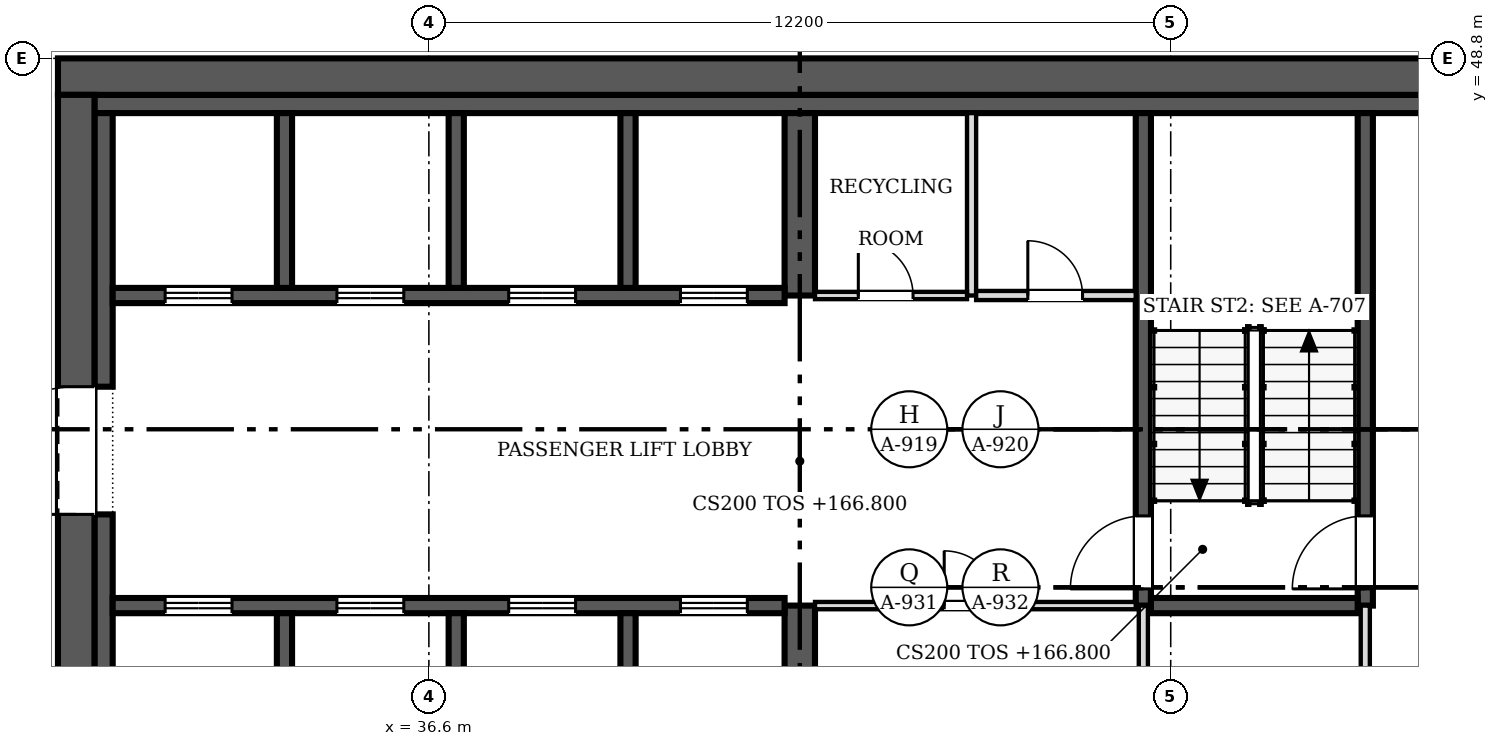
"""IFC4 building model, lengths in metres.
Left out: names, types, materials, properties, quantities, classifications, styles, units other than length and angle.
Written with IfcOpenShell. Run it as: python <this file> out.ifc"""

import sys

from ifc_helpers import new_model, si_unit, direction, frame, frame_2d, origin, place, context, subcontext, project, spatial, rectangle, extrude, source, transform, mapped, element, fill, save


model = new_model("IFC4")
c1 = context("Model", 3, precision=1e-05, world=origin(), true_north=direction((0.0, 1.0)))
c2 = subcontext(c1, "Body", "Model", "MODEL_VIEW")
j1 = project(units=[si_unit("LENGTHUNIT", "METRE"), si_unit("PLANEANGLEUNIT", "RADIAN")], contexts=[c1])
p1 = place(None, origin())
s1 = spatial("IfcSite", under=j1, at=p1, CompositionType="ELEMENT")
p2 = place(p1, origin())
s2 = spatial("IfcBuilding", under=s1, at=p2, CompositionType="ELEMENT")
p3 = place(p2, frame((0.0, 0.0, 166.8)))
s3 = spatial("IfcBuildingStorey", under=s2, at=p3, CompositionType="ELEMENT", Elevation=166.8)
p4 = place(p3, frame((30.8, 25.0, 0.0), z_axis=(0.0, 0.0, 1.0), x_axis=(0.0, 1.0, 0.0)))
e1 = element("IfcWall", 1, at=p4, inside=s3, PredefinedType="SHEAR", context=c2, shape_type="SweptSolid", body=[
    extrude(rectangle(XDim=23.2, YDim=0.6, at=frame_2d((11.6, 0.0))), origin(), (0.0, 0.0, 1.0), 3.8),
])
m1 = source(origin(), c2, "Body", "SweptSolid", [
    extrude(rectangle(XDim=2.1, YDim=2.4, at=frame_2d((1.05, 1.2))), frame((0.0, 0.31, 0.0), z_axis=(0.0, -1.0, 0.0), x_axis=(1.0, 0.0, 0.0)), (0.0, 0.0, 1.0), 0.62),
])
p5 = place(p4, frame((4.8, 0.0, 0.0)))
e2 = element("IfcOpeningElement", 2, at=p5, cuts=e1, PredefinedType="OPENING", context=c2, shape_type="MappedRepresentation", body=[
    mapped(m1, transform((0.0, 0.0, 0.0), scale=1.0)),
])
p6 = place(p4, frame((16.3, 0.0, 0.0)))
e3 = element("IfcOpeningElement", 3, at=p6, cuts=e1, PredefinedType="OPENING", context=c2, shape_type="MappedRepresentation", body=[
    mapped(m1, transform((0.0, 0.0, 0.0), scale=1.0)),
])
p7 = place(p3, frame((30.5, 48.5, 0.0), z_axis=(0.0, 0.0, 1.0), x_axis=(1.0, 0.0, 0.0)))
e4 = element("IfcWall", 4, at=p7, inside=s3, PredefinedType="SHEAR", context=c2, shape_type="SweptSolid", body=[
    extrude(rectangle(XDim=24.4, YDim=0.6, at=frame_2d((12.2, 0.0))), origin(), (0.0, 0.0, 1.0), 3.8),
])
p8 = place(p3, frame((31.1, 48.05, 0.0), z_axis=(0.0, 0.0, 1.0), x_axis=(1.0, 0.0, 0.0)))
e5 = element("IfcWall", 5, at=p8, inside=s3, PredefinedType="SOLIDWALL", context=c2, shape_type="SweptSolid", body=[
    extrude(rectangle(XDim=23.2, YDim=0.3, at=frame_2d((11.6, 0.0))), origin(), (0.0, 0.0, 1.0), 3.8),
])
p9 = place(p3, frame((31.25, 31.9, 0.0), z_axis=(0.0, 0.0, 1.0), x_axis=(0.0, 1.0, 0.0)))
e6 = element("IfcWall", 6, at=p9, inside=s3, PredefinedType="SOLIDWALL", context=c2, shape_type="SweptSolid", body=[
    extrude(rectangle(XDim=9.4, YDim=0.3, at=frame_2d((4.7, 0.0))), origin(), (0.0, 0.0, 1.0), 3.8),
])
p10 = place(p3, frame((31.25, 43.4, 0.0), z_axis=(0.0, 0.0, 1.0), x_axis=(0.0, 1.0, 0.0)))
e7 = element("IfcWall", 7, at=p10, inside=s3, PredefinedType="SOLIDWALL", context=c2, shape_type="SweptSolid", body=[
    extrude(rectangle(XDim=4.5, YDim=0.3, at=frame_2d((2.25, 0.0))), origin(), (0.0, 0.0, 1.0), 3.8),
])
p11 = place(p3, frame((42.7, 36.85, 0.0), z_axis=(0.0, 0.0, 1.0), x_axis=(0.0, 1.0, 0.0)))
e8 = element("IfcWall", 8, at=p11, inside=s3, PredefinedType="SHEAR", context=c2, shape_type="SweptSolid", body=[
    extrude(rectangle(XDim=2.95, YDim=0.5, at=frame_2d((1.475, 0.0))), origin(), (0.0, 0.0, 1.0), 3.8),
])
p12 = place(p3, frame((42.7, 44.9, 0.0), z_axis=(0.0, 0.0, 1.0), x_axis=(0.0, 1.0, 0.0)))
e9 = element("IfcWall", 9, at=p12, inside=s3, PredefinedType="SHEAR", context=c2, shape_type="SweptSolid", body=[
    extrude(rectangle(XDim=3.0, YDim=0.5, at=frame_2d((1.5, 0.0))), origin(), (0.0, 0.0, 1.0), 3.8),
])
p13 = place(p3, frame((31.4, 39.8, 0.0), z_axis=(0.0, 0.0, 1.0), x_axis=(1.0, 0.0, 0.0)))
e10 = element("IfcWall", 10, at=p13, inside=s3, PredefinedType="SOLIDWALL", context=c2, shape_type="SweptSolid", body=[
    extrude(rectangle(XDim=11.05, YDim=0.25, at=frame_2d((5.525, 0.0))), origin(), (0.0, 0.0, 1.0), 3.8),
])
m2 = source(origin(), c2, "Body", "SweptSolid", [
    extrude(rectangle(XDim=1.1, YDim=2.1, at=frame_2d((0.55, 1.05))), frame((0.0, 0.135, 0.0), z_axis=(0.0, -1.0, 0.0), x_axis=(1.0, 0.0, 0.0)), (0.0, 0.0, 1.0), 0.27),
])
p14 = place(p13, frame((0.863, 0.0, 0.0)))
e11 = element("IfcOpeningElement", 11, at=p14, cuts=e10, PredefinedType="OPENING", context=c2, shape_type="MappedRepresentation", body=[
    mapped(m2, transform((0.0, 0.0, 0.0), scale=1.0)),
])
p15 = place(p13, frame((3.688, 0.0, 0.0)))
e12 = element("IfcOpeningElement", 12, at=p15, cuts=e10, PredefinedType="OPENING", context=c2, shape_type="MappedRepresentation", body=[
    mapped(m2, transform((0.0, 0.0, 0.0), scale=1.0)),
])
p16 = place(p13, frame((6.512, 0.0, 0.0)))
e13 = element("IfcOpeningElement", 13, at=p16, cuts=e10, PredefinedType="OPENING", context=c2, shape_type="MappedRepresentation", body=[
    mapped(m2, transform((0.0, 0.0, 0.0), scale=1.0)),
])
p17 = place(p13, frame((9.337, 0.0, 0.0)))
e14 = element("IfcOpeningElement", 14, at=p17, cuts=e10, PredefinedType="OPENING", context=c2, shape_type="MappedRepresentation", body=[
    mapped(m2, transform((0.0, 0.0, 0.0), scale=1.0)),
])
p18 = place(p3, frame((42.45, 44.9, 0.0), z_axis=(0.0, 0.0, 1.0), x_axis=(-1.0, 0.0, 0.0)))
e15 = element("IfcWall", 15, at=p18, inside=s3, PredefinedType="SOLIDWALL", context=c2, shape_type="SweptSolid", body=[
    extrude(rectangle(XDim=11.05, YDim=0.25, at=frame_2d((5.525, 0.0))), origin(), (0.0, 0.0, 1.0), 3.8),
])
p19 = place(p18, frame((9.087, 0.0, 0.0)))
e16 = element("IfcOpeningElement", 16, at=p19, cuts=e15, PredefinedType="OPENING", context=c2, shape_type="MappedRepresentation", body=[
    mapped(m2, transform((0.0, 0.0, 0.0), scale=1.0)),
])
p20 = place(p18, frame((6.262, 0.0, 0.0)))
e17 = element("IfcOpeningElement", 17, at=p20, cuts=e15, PredefinedType="OPENING", context=c2, shape_type="MappedRepresentation", body=[
    mapped(m2, transform((0.0, 0.0, 0.0), scale=1.0)),
])
p21 = place(p18, frame((3.438, 0.0, 0.0)))
e18 = element("IfcOpeningElement", 18, at=p21, cuts=e15, PredefinedType="OPENING", context=c2, shape_type="MappedRepresentation", body=[
    mapped(m2, transform((0.0, 0.0, 0.0), scale=1.0)),
])
p22 = place(p18, frame((0.613, 0.0, 0.0)))
e19 = element("IfcOpeningElement", 19, at=p22, cuts=e15, PredefinedType="OPENING", context=c2, shape_type="MappedRepresentation", body=[
    mapped(m2, transform((0.0, 0.0, 0.0), scale=1.0)),
])
p23 = place(p3, frame((48.35, 47.9, 0.0), z_axis=(0.0, 0.0, 1.0), x_axis=(0.0, -1.0, 0.0)))
e20 = element("IfcWall", 20, at=p23, inside=s3, PredefinedType="SOLIDWALL", context=c2, shape_type="SweptSolid", body=[
    extrude(rectangle(XDim=8.1, YDim=0.25, at=frame_2d((4.05, 0.0))), origin(), (0.0, 0.0, 1.0), 3.8),
])
m3 = source(origin(), c2, "Body", "SweptSolid", [
    extrude(rectangle(XDim=1.2, YDim=2.1, at=frame_2d((0.6, 1.05))), frame((0.0, 0.135, 0.0), z_axis=(0.0, -1.0, 0.0), x_axis=(1.0, 0.0, 0.0)), (0.0, 0.0, 1.0), 0.27),
])
p24 = place(p23, frame((6.625, 0.0, 0.0)))
e21 = element("IfcOpeningElement", 21, at=p24, cuts=e20, PredefinedType="OPENING", context=c2, shape_type="MappedRepresentation", body=[
    mapped(m3, transform((0.0, 0.0, 0.0), scale=1.0)),
])
p25 = place(p3, frame((52.0, 39.8, 0.0), z_axis=(0.0, 0.0, 1.0), x_axis=(0.0, 1.0, 0.0)))
e22 = element("IfcWall", 22, at=p25, inside=s3, PredefinedType="SOLIDWALL", context=c2, shape_type="SweptSolid", body=[
    extrude(rectangle(XDim=8.1, YDim=0.25, at=frame_2d((4.05, 0.0))), origin(), (0.0, 0.0, 1.0), 3.8),
])
p26 = place(p25, frame((0.275, 0.0, 0.0)))
e23 = element("IfcOpeningElement", 23, at=p26, cuts=e22, PredefinedType="OPENING", context=c2, shape_type="MappedRepresentation", body=[
    mapped(m3, transform((0.0, 0.0, 0.0), scale=1.0)),
])
p27 = place(p3, frame((48.475, 39.8, 0.0), z_axis=(0.0, 0.0, 1.0), x_axis=(1.0, 0.0, 0.0)))
e24 = element("IfcWall", 24, at=p27, inside=s3, PredefinedType="SOLIDWALL", context=c2, shape_type="SweptSolid", body=[
    extrude(rectangle(XDim=3.4, YDim=0.25, at=frame_2d((1.7, 0.0))), origin(), (0.0, 0.0, 1.0), 3.8),
])
for number, where, z_axis, x_axis in (
    (25, (34.225, 36.85, 0.0), (0.0, 0.0, 1.0), (0.0, 1.0, 0.0)),
    (26, (37.05, 36.85, 0.0), (0.0, 0.0, 1.0), (0.0, 1.0, 0.0)),
    (27, (39.875, 36.85, 0.0), (0.0, 0.0, 1.0), (0.0, 1.0, 0.0)),
):
    element("IfcWall", number, at=place(p3, frame(where, z_axis=z_axis, x_axis=x_axis)), inside=s3, PredefinedType="SOLIDWALL", context=c2, shape_type="SweptSolid", body=[
        extrude(rectangle(XDim=2.825, YDim=0.25, at=frame_2d((1.413, 0.0))), origin(), (0.0, 0.0, 1.0), 3.8),
    ])
for number, where, z_axis, x_axis in (
    (28, (34.225, 45.025, 0.0), (0.0, 0.0, 1.0), (0.0, 1.0, 0.0)),
    (29, (37.05, 45.025, 0.0), (0.0, 0.0, 1.0), (0.0, 1.0, 0.0)),
    (30, (39.875, 45.025, 0.0), (0.0, 0.0, 1.0), (0.0, 1.0, 0.0)),
):
    element("IfcWall", number, at=place(p3, frame(where, z_axis=z_axis, x_axis=x_axis)), inside=s3, PredefinedType="SOLIDWALL", context=c2, shape_type="SweptSolid", body=[
        extrude(rectangle(XDim=2.875, YDim=0.25, at=frame_2d((1.438, 0.0))), origin(), (0.0, 0.0, 1.0), 3.8),
    ])
p28 = place(p3, frame((52.0, 33.525, 0.0), z_axis=(0.0, 0.0, 1.0), x_axis=(0.0, 1.0, 0.0)))
e31 = element("IfcWall", 31, at=p28, inside=s3, PredefinedType="PARTITIONING", context=c2, shape_type="SweptSolid", body=[
    extrude(rectangle(XDim=6.275, YDim=0.15, at=frame_2d((3.138, 0.0))), origin(), (0.0, 0.0, 1.0), 3.6),
])
m4 = source(origin(), c2, "Body", "SweptSolid", [
    extrude(rectangle(XDim=0.9, YDim=2.1, at=frame_2d((0.45, 1.05))), frame((0.0, 0.085, 0.0), z_axis=(0.0, -1.0, 0.0), x_axis=(1.0, 0.0, 0.0)), (0.0, 0.0, 1.0), 0.17),
])
p29 = place(p28, frame((1.025, 0.0, 0.0)))
e32 = element("IfcOpeningElement", 32, at=p29, cuts=e31, PredefinedType="OPENING", context=c2, shape_type="MappedRepresentation", body=[
    mapped(m4, transform((0.0, 0.0, 0.0), scale=1.0)),
])
p30 = place(p3, frame((48.225, 39.8, 0.0), z_axis=(0.0, 0.0, 1.0), x_axis=(-1.0, 0.0, 0.0)))
e33 = element("IfcWall", 33, at=p30, inside=s3, PredefinedType="PARTITIONING", context=c2, shape_type="SweptSolid", body=[
    extrude(rectangle(XDim=5.275, YDim=0.12, at=frame_2d((2.638, 0.0))), origin(), (0.0, 0.0, 1.0), 3.6),
])
m5 = source(origin(), c2, "Body", "SweptSolid", [
    extrude(rectangle(XDim=0.9, YDim=2.1, at=frame_2d((0.45, 1.05))), frame((0.0, 0.07, 0.0), z_axis=(0.0, -1.0, 0.0), x_axis=(1.0, 0.0, 0.0)), (0.0, 0.0, 1.0), 0.14),
])
p31 = place(p30, frame((2.25, 0.0, 0.0)))
e34 = element("IfcOpeningElement", 34, at=p31, cuts=e33, PredefinedType="OPENING", context=c2, shape_type="MappedRepresentation", body=[
    mapped(m5, transform((0.0, 0.0, 0.0), scale=1.0)),
])
p32 = place(p3, frame((48.35, 36.85, 0.0), z_axis=(0.0, 0.0, 1.0), x_axis=(0.0, 1.0, 0.0)))
e35 = element("IfcWall", 35, at=p32, inside=s3, PredefinedType="PARTITIONING", context=c2, shape_type="SweptSolid", body=[
    extrude(rectangle(XDim=2.95, YDim=0.15, at=frame_2d((1.475, 0.0))), origin(), (0.0, 0.0, 1.0), 3.6),
])
p33 = place(p3, frame((45.525, 44.9, 0.0), z_axis=(0.0, 0.0, 1.0), x_axis=(0.0, 1.0, 0.0)))
e36 = element("IfcWall", 36, at=p33, inside=s3, PredefinedType="PARTITIONING", context=c2, shape_type="SweptSolid", body=[
    extrude(rectangle(XDim=3.0, YDim=0.15, at=frame_2d((1.5, 0.0))), origin(), (0.0, 0.0, 1.0), 3.6),
])
p34 = place(p3, frame((42.95, 44.9, 0.0), z_axis=(0.0, 0.0, 1.0), x_axis=(1.0, 0.0, 0.0)))
e37 = element("IfcWall", 37, at=p34, inside=s3, PredefinedType="PARTITIONING", context=c2, shape_type="SweptSolid", body=[
    extrude(rectangle(XDim=2.5, YDim=0.12, at=frame_2d((1.25, 0.0))), origin(), (0.0, 0.0, 1.0), 3.6),
])
p35 = place(p34, frame((0.712, 0.0, 0.0)))
e38 = element("IfcOpeningElement", 38, at=p35, cuts=e37, PredefinedType="OPENING", context=c2, shape_type="MappedRepresentation", body=[
    mapped(m5, transform((0.0, 0.0, 0.0), scale=1.0)),
])
p36 = place(p3, frame((45.6, 44.9, 0.0), z_axis=(0.0, 0.0, 1.0), x_axis=(1.0, 0.0, 0.0)))
e39 = element("IfcWall", 39, at=p36, inside=s3, PredefinedType="PARTITIONING", context=c2, shape_type="SweptSolid", body=[
    extrude(rectangle(XDim=2.625, YDim=0.15, at=frame_2d((1.312, 0.0))), origin(), (0.0, 0.0, 1.0), 3.6),
])
p37 = place(p36, frame((0.85, 0.0, 0.0)))
e40 = element("IfcOpeningElement", 40, at=p37, cuts=e39, PredefinedType="OPENING", context=c2, shape_type="MappedRepresentation", body=[
    mapped(m4, transform((0.0, 0.0, 0.0), scale=1.0)),
])
m6 = source(origin(), c2, "Body", "SweptSolid", [
    extrude(rectangle(XDim=2.1, YDim=2.4, at=frame_2d((1.05, 1.2))), frame((0.0, 0.025, 0.0), z_axis=(0.0, -1.0, 0.0), x_axis=(1.0, 0.0, 0.0)), (0.0, 0.0, 1.0), 0.05),
])
p38 = place(p6, origin())
e41 = element("IfcDoor", 41, at=p38, inside=s3, OperationType="DOUBLE_DOOR_SINGLE_SWING", PredefinedType="DOOR", context=c2, shape_type="MappedRepresentation", body=[
    mapped(m6, transform((0.0, 0.0, 0.0), scale=1.0)),
])
fill(e3, e41)
m7 = source(origin(), c2, "Body", "SweptSolid", [
    extrude(rectangle(XDim=1.1, YDim=2.1, at=frame_2d((0.55, 1.05))), frame((0.0, 0.025, 0.0), z_axis=(0.0, -1.0, 0.0), x_axis=(1.0, 0.0, 0.0)), (0.0, 0.0, 1.0), 0.05),
])
p39 = place(p14, origin())
e42 = element("IfcDoor", 42, at=p39, inside=s3, OperationType="DOUBLE_DOOR_SLIDING", PredefinedType="DOOR", context=c2, shape_type="MappedRepresentation", body=[
    mapped(m7, transform((0.0, 0.0, 0.0), scale=1.0)),
])
fill(e11, e42)
p40 = place(p15, origin())
e43 = element("IfcDoor", 43, at=p40, inside=s3, OperationType="DOUBLE_DOOR_SLIDING", PredefinedType="DOOR", context=c2, shape_type="MappedRepresentation", body=[
    mapped(m7, transform((0.0, 0.0, 0.0), scale=1.0)),
])
fill(e12, e43)
p41 = place(p16, origin())
e44 = element("IfcDoor", 44, at=p41, inside=s3, OperationType="DOUBLE_DOOR_SLIDING", PredefinedType="DOOR", context=c2, shape_type="MappedRepresentation", body=[
    mapped(m7, transform((0.0, 0.0, 0.0), scale=1.0)),
])
fill(e13, e44)
p42 = place(p17, origin())
e45 = element("IfcDoor", 45, at=p42, inside=s3, OperationType="DOUBLE_DOOR_SLIDING", PredefinedType="DOOR", context=c2, shape_type="MappedRepresentation", body=[
    mapped(m7, transform((0.0, 0.0, 0.0), scale=1.0)),
])
fill(e14, e45)
p43 = place(p19, origin())
e46 = element("IfcDoor", 46, at=p43, inside=s3, OperationType="DOUBLE_DOOR_SLIDING", PredefinedType="DOOR", context=c2, shape_type="MappedRepresentation", body=[
    mapped(m7, transform((0.0, 0.0, 0.0), scale=1.0)),
])
fill(e16, e46)
p44 = place(p20, origin())
e47 = element("IfcDoor", 47, at=p44, inside=s3, OperationType="DOUBLE_DOOR_SLIDING", PredefinedType="DOOR", context=c2, shape_type="MappedRepresentation", body=[
    mapped(m7, transform((0.0, 0.0, 0.0), scale=1.0)),
])
fill(e17, e47)
p45 = place(p21, origin())
e48 = element("IfcDoor", 48, at=p45, inside=s3, OperationType="DOUBLE_DOOR_SLIDING", PredefinedType="DOOR", context=c2, shape_type="MappedRepresentation", body=[
    mapped(m7, transform((0.0, 0.0, 0.0), scale=1.0)),
])
fill(e18, e48)
p46 = place(p22, origin())
e49 = element("IfcDoor", 49, at=p46, inside=s3, OperationType="DOUBLE_DOOR_SLIDING", PredefinedType="DOOR", context=c2, shape_type="MappedRepresentation", body=[
    mapped(m7, transform((0.0, 0.0, 0.0), scale=1.0)),
])
fill(e19, e49)
m8 = source(origin(), c2, "Body", "SweptSolid", [
    extrude(rectangle(XDim=1.2, YDim=2.1, at=frame_2d((0.6, 1.05))), frame((0.0, 0.025, 0.0), z_axis=(0.0, -1.0, 0.0), x_axis=(1.0, 0.0, 0.0)), (0.0, 0.0, 1.0), 0.05),
])
p47 = place(p24, origin())
e50 = element("IfcDoor", 50, at=p47, inside=s3, OperationType="SINGLE_SWING_RIGHT", PredefinedType="DOOR", context=c2, shape_type="MappedRepresentation", body=[
    mapped(m8, transform((0.0, 0.0, 0.0), scale=1.0)),
])
fill(e21, e50)
p48 = place(p26, origin())
e51 = element("IfcDoor", 51, at=p48, inside=s3, OperationType="SINGLE_SWING_LEFT", PredefinedType="DOOR", context=c2, shape_type="MappedRepresentation", body=[
    mapped(m8, transform((0.0, 0.0, 0.0), scale=1.0)),
])
fill(e23, e51)
m9 = source(origin(), c2, "Body", "SweptSolid", [
    extrude(rectangle(XDim=0.9, YDim=2.1, at=frame_2d((0.45, 1.05))), frame((0.0, 0.025, 0.0), z_axis=(0.0, -1.0, 0.0), x_axis=(1.0, 0.0, 0.0)), (0.0, 0.0, 1.0), 0.05),
])
p49 = place(p31, origin())
e52 = element("IfcDoor", 52, at=p49, inside=s3, OperationType="SINGLE_SWING_RIGHT", PredefinedType="DOOR", context=c2, shape_type="MappedRepresentation", body=[
    mapped(m9, transform((0.0, 0.0, 0.0), scale=1.0)),
])
fill(e34, e52)
p50 = place(p35, origin())
e53 = element("IfcDoor", 53, at=p50, inside=s3, OperationType="SINGLE_SWING_LEFT", PredefinedType="DOOR", context=c2, shape_type="MappedRepresentation", body=[
    mapped(m9, transform((0.0, 0.0, 0.0), scale=1.0)),
])
fill(e38, e53)
p51 = place(p37, origin())
e54 = element("IfcDoor", 54, at=p51, inside=s3, OperationType="SINGLE_SWING_LEFT", PredefinedType="DOOR", context=c2, shape_type="MappedRepresentation", body=[
    mapped(m9, transform((0.0, 0.0, 0.0), scale=1.0)),
])
fill(e40, e54)
save(model, sys.argv[1])
